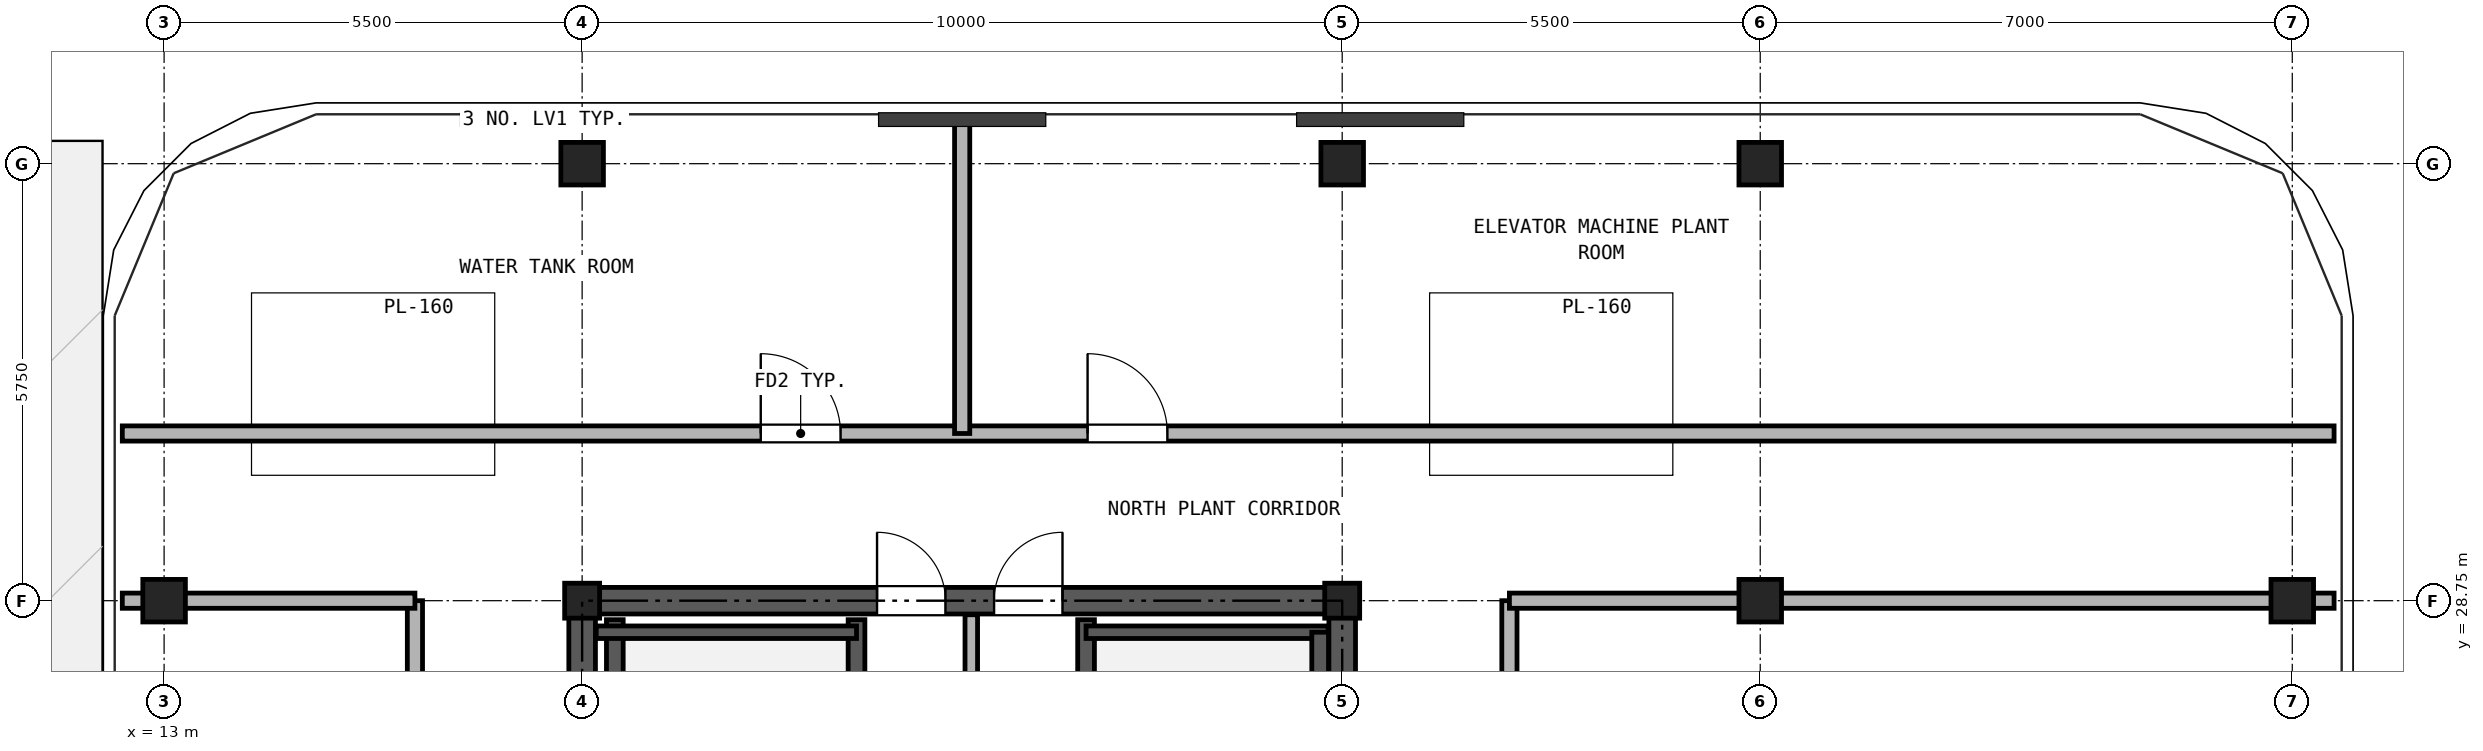
"""IFC4 building model, lengths in metres.
Left out: names, types, materials, properties, quantities, classifications, styles, units other than length and angle.
Written with IfcOpenShell. Run it as: python <this file> out.ifc"""

import sys

from ifc_helpers import new_model, si_unit, direction, frame, frame_2d, origin, origin_2d, place, context, subcontext, project, spatial, rectangle, hollow_rectangle, extrude, source, transform, mapped, element, fill, save


model = new_model("IFC4")
c1 = context("Model", 3, precision=1e-05, world=origin(), true_north=direction((0.0, 1.0)))
c2 = subcontext(c1, "Body", "Model", "MODEL_VIEW")
j1 = project(units=[si_unit("LENGTHUNIT", "METRE"), si_unit("PLANEANGLEUNIT", "RADIAN")], contexts=[c1])
p1 = place(None, origin())
s1 = spatial("IfcSite", under=j1, at=p1, CompositionType="ELEMENT")
p2 = place(p1, origin())
s2 = spatial("IfcBuilding", under=s1, at=p2, CompositionType="ELEMENT")
p3 = place(p2, frame((0.0, 0.0, 278.5)))
s3 = spatial("IfcBuildingStorey", under=s2, at=p3, CompositionType="ELEMENT", Elevation=278.5)
m1 = source(origin(), c2, "Body", "SweptSolid", [
    extrude(hollow_rectangle(XDim=0.56, YDim=0.56, WallThickness=0.03, at=origin_2d()), origin(), (0.0, 0.0, 1.0), 3.38),
])
for number, where, z_axis, x_axis in (
    (1, (18.5, 34.5, 0.0), (0.0, 0.0, 1.0), (1.0, 0.0, 0.0)),
    (2, (28.5, 34.5, 0.0), (0.0, 0.0, 1.0), (1.0, 0.0, 0.0)),
    (3, (34.0, 34.5, 0.0), (0.0, 0.0, 1.0), (1.0, 0.0, 0.0)),
    (4, (13.0, 28.75, 0.0), (0.0, 0.0, 1.0), (1.0, 0.0, 0.0)),
    (5, (41.0, 28.75, 0.0), (0.0, 0.0, 1.0), (1.0, 0.0, 0.0)),
):
    element("IfcColumn", number, at=place(p3, frame(where, z_axis=z_axis, x_axis=x_axis)), inside=s3, PredefinedType="COLUMN", context=c2, shape_type="MappedRepresentation", body=[
        mapped(m1, transform((0.0, 0.0, 0.0), x_axis=(1.0, 0.0, 0.0), y_axis=(0.0, 1.0, 0.0), z_axis=(0.0, 0.0, 1.0), scale=1.0)),
    ])
m2 = source(origin(), c2, "Body", "SweptSolid", [
    extrude(hollow_rectangle(XDim=0.46, YDim=0.46, WallThickness=0.025, at=origin_2d()), origin(), (0.0, 0.0, 1.0), 3.38),
])
for number, where, z_axis, x_axis in (
    (6, (18.5, 28.75, 0.0), (0.0, 0.0, 1.0), (1.0, 0.0, 0.0)),
    (7, (28.5, 28.75, 0.0), (0.0, 0.0, 1.0), (1.0, 0.0, 0.0)),
):
    element("IfcColumn", number, at=place(p3, frame(where, z_axis=z_axis, x_axis=x_axis)), inside=s3, PredefinedType="COLUMN", context=c2, shape_type="MappedRepresentation", body=[
        mapped(m2, transform((0.0, 0.0, 0.0), x_axis=(1.0, 0.0, 0.0), y_axis=(0.0, 1.0, 0.0), z_axis=(0.0, 0.0, 1.0), scale=1.0)),
    ])
p4 = place(p3, frame((34.0, 28.75, 0.0), z_axis=(0.0, 0.0, 1.0), x_axis=(1.0, 0.0, 0.0)))
e8 = element("IfcColumn", 8, at=p4, inside=s3, PredefinedType="COLUMN", context=c2, shape_type="MappedRepresentation", body=[
    mapped(m1, transform((0.0, 0.0, 0.0), x_axis=(1.0, 0.0, 0.0), y_axis=(0.0, 1.0, 0.0), z_axis=(0.0, 0.0, 1.0), scale=1.0)),
])
p5 = place(p3, frame((18.325, 28.75, 0.0), z_axis=(0.0, 0.0, 1.0), x_axis=(1.0, 0.0, 0.0)))
e9 = element("IfcWall", 9, at=p5, inside=s3, PredefinedType="SHEAR", context=c2, shape_type="SweptSolid", body=[
    extrude(rectangle(XDim=10.35, YDim=0.35, at=frame_2d((5.175, 0.0))), origin(), (0.0, 0.0, 1.0), 3.38),
])
p6 = place(p5, frame((4.055, 0.0, 0.0)))
e10 = element("IfcOpeningElement", 10, at=p6, cuts=e9, PredefinedType="OPENING", context=c2, shape_type="SweptSolid", body=[
    extrude(rectangle(XDim=0.9, YDim=2.05, at=frame_2d((0.45, 1.025))), frame((0.0, 0.185, 0.0), z_axis=(0.0, -1.0, 0.0), x_axis=(1.0, 0.0, 0.0)), (0.0, 0.0, 1.0), 0.37),
])
p7 = place(p5, frame((5.595, 0.0, 0.0)))
e11 = element("IfcOpeningElement", 11, at=p7, cuts=e9, PredefinedType="OPENING", context=c2, shape_type="SweptSolid", body=[
    extrude(rectangle(XDim=0.9, YDim=2.05, at=frame_2d((0.45, 1.025))), frame((0.0, 0.185, 0.0), z_axis=(0.0, -1.0, 0.0), x_axis=(1.0, 0.0, 0.0)), (0.0, 0.0, 1.0), 0.37),
])
p8 = place(p3, frame((18.5, 11.675, 0.0), z_axis=(0.0, 0.0, 1.0), x_axis=(0.0, 1.0, 0.0)))
e12 = element("IfcWall", 12, at=p8, inside=s3, PredefinedType="SHEAR", context=c2, shape_type="SweptSolid", body=[
    extrude(rectangle(XDim=16.9, YDim=0.35, at=frame_2d((8.45, 0.0))), origin(), (0.0, 0.0, 1.0), 3.38),
])
p9 = place(p8, frame((7.475, 0.0, 0.0)))
e13 = element("IfcOpeningElement", 13, at=p9, cuts=e12, PredefinedType="OPENING", context=c2, shape_type="SweptSolid", body=[
    extrude(rectangle(XDim=1.15, YDim=2.2, at=frame_2d((0.575, 1.1))), frame((0.0, 0.185, 0.0), z_axis=(0.0, -1.0, 0.0), x_axis=(1.0, 0.0, 0.0)), (0.0, 0.0, 1.0), 0.37),
])
p10 = place(p3, frame((28.5, 11.675, 0.0), z_axis=(0.0, 0.0, 1.0), x_axis=(0.0, 1.0, 0.0)))
e14 = element("IfcWall", 14, at=p10, inside=s3, PredefinedType="SHEAR", context=c2, shape_type="SweptSolid", body=[
    extrude(rectangle(XDim=16.9, YDim=0.35, at=frame_2d((8.45, 0.0))), origin(), (0.0, 0.0, 1.0), 3.38),
])
p11 = place(p10, frame((7.475, 0.0, 0.0)))
e15 = element("IfcOpeningElement", 15, at=p11, cuts=e14, PredefinedType="OPENING", context=c2, shape_type="SweptSolid", body=[
    extrude(rectangle(XDim=1.15, YDim=2.2, at=frame_2d((0.575, 1.1))), frame((0.0, 0.185, 0.0), z_axis=(0.0, -1.0, 0.0), x_axis=(1.0, 0.0, 0.0)), (0.0, 0.0, 1.0), 0.37),
])
for number, where, z_axis, x_axis in (
    (16, (18.93, 21.39, 0.0), (0.0, 0.0, 1.0), (0.0, 1.0, 0.0)),
    (17, (22.11, 21.39, 0.0), (0.0, 0.0, 1.0), (0.0, 1.0, 0.0)),
    (18, (25.13, 21.39, 0.0), (0.0, 0.0, 1.0), (0.0, 1.0, 0.0)),
):
    element("IfcWall", number, at=place(p3, frame(where, z_axis=z_axis, x_axis=x_axis)), inside=s3, PredefinedType="SOLIDWALL", context=c2, shape_type="SweptSolid", body=[
        extrude(rectangle(XDim=7.11, YDim=0.22, at=frame_2d((3.555, 0.0))), origin(), (0.0, 0.0, 1.0), 3.38),
    ])
p12 = place(p3, frame((18.685, 28.335, 0.0), z_axis=(0.0, 0.0, 1.0), x_axis=(1.0, 0.0, 0.0)))
e19 = element("IfcWall", 19, at=p12, inside=s3, PredefinedType="PARTITIONING", context=c2, shape_type="SweptSolid", body=[
    extrude(rectangle(XDim=3.425, YDim=0.165, at=frame_2d((1.712, 0.0))), origin(), (0.0, 0.0, 1.0), 3.38),
])
p13 = place(p3, frame((25.13, 28.335, 0.0), z_axis=(0.0, 0.0, 1.0), x_axis=(1.0, 0.0, 0.0)))
e20 = element("IfcWall", 20, at=p13, inside=s3, PredefinedType="PARTITIONING", context=c2, shape_type="SweptSolid", body=[
    extrude(rectangle(XDim=3.185, YDim=0.165, at=frame_2d((1.593, 0.0))), origin(), (0.0, 0.0, 1.0), 3.38),
])
p14 = place(p3, frame((28.21, 21.39, 0.0), z_axis=(0.0, 0.0, 1.0), x_axis=(0.0, 1.0, 0.0)))
e21 = element("IfcWall", 21, at=p14, inside=s3, PredefinedType="SOLIDWALL", context=c2, shape_type="SweptSolid", body=[
    extrude(rectangle(XDim=6.945, YDim=0.22, at=frame_2d((3.473, 0.0))), origin(), (0.0, 0.0, 1.0), 3.38),
])
p15 = place(p3, frame((23.62, 24.4, 0.0), z_axis=(0.0, 0.0, 1.0), x_axis=(0.0, 1.0, 0.0)))
e22 = element("IfcWall", 22, at=p15, inside=s3, PredefinedType="PARTITIONING", context=c2, shape_type="SweptSolid", body=[
    extrude(rectangle(XDim=4.165, YDim=0.165, at=frame_2d((2.083, 0.0))), origin(), (0.0, 0.0, 1.0), 3.38),
])
p16 = place(p3, frame((12.45, 30.95, 0.0), z_axis=(0.0, 0.0, 1.0), x_axis=(1.0, 0.0, 0.0)))
e23 = element("IfcWall", 23, at=p16, inside=s3, PredefinedType="PARTITIONING", context=c2, shape_type="SweptSolid", body=[
    extrude(rectangle(XDim=29.1, YDim=0.2, at=frame_2d((14.55, 0.0))), origin(), (0.0, 0.0, 1.0), 3.38),
])
p17 = place(p16, frame((8.4, 0.0, 0.0)))
e24 = element("IfcOpeningElement", 24, at=p17, cuts=e23, PredefinedType="OPENING", context=c2, shape_type="SweptSolid", body=[
    extrude(rectangle(XDim=1.05, YDim=2.15, at=frame_2d((0.525, 1.075))), frame((0.0, 0.11, 0.0), z_axis=(0.0, -1.0, 0.0), x_axis=(1.0, 0.0, 0.0)), (0.0, 0.0, 1.0), 0.22),
])
p18 = place(p16, frame((12.7, 0.0, 0.0)))
e25 = element("IfcOpeningElement", 25, at=p18, cuts=e23, PredefinedType="OPENING", context=c2, shape_type="SweptSolid", body=[
    extrude(rectangle(XDim=1.05, YDim=2.15, at=frame_2d((0.525, 1.075))), frame((0.0, 0.11, 0.0), z_axis=(0.0, -1.0, 0.0), x_axis=(1.0, 0.0, 0.0)), (0.0, 0.0, 1.0), 0.22),
])
p19 = place(p3, frame((16.3, 8.9, 0.0), z_axis=(0.0, 0.0, 1.0), x_axis=(0.0, 1.0, 0.0)))
e26 = element("IfcWall", 26, at=p19, inside=s3, PredefinedType="PARTITIONING", context=c2, shape_type="SweptSolid", body=[
    extrude(rectangle(XDim=19.85, YDim=0.2, at=frame_2d((9.925, 0.0))), origin(), (0.0, 0.0, 1.0), 3.38),
])
p20 = place(p19, frame((4.55, 0.0, 0.0)))
e27 = element("IfcOpeningElement", 27, at=p20, cuts=e26, PredefinedType="OPENING", context=c2, shape_type="SweptSolid", body=[
    extrude(rectangle(XDim=1.05, YDim=2.15, at=frame_2d((0.525, 1.075))), frame((0.0, 0.11, 0.0), z_axis=(0.0, -1.0, 0.0), x_axis=(1.0, 0.0, 0.0)), (0.0, 0.0, 1.0), 0.22),
])
p21 = place(p19, frame((14.475, 0.0, 0.0)))
e28 = element("IfcOpeningElement", 28, at=p21, cuts=e26, PredefinedType="OPENING", context=c2, shape_type="SweptSolid", body=[
    extrude(rectangle(XDim=1.05, YDim=2.15, at=frame_2d((0.525, 1.075))), frame((0.0, 0.11, 0.0), z_axis=(0.0, -1.0, 0.0), x_axis=(1.0, 0.0, 0.0)), (0.0, 0.0, 1.0), 0.22),
])
p22 = place(p3, frame((30.7, 8.9, 0.0), z_axis=(0.0, 0.0, 1.0), x_axis=(0.0, 1.0, 0.0)))
e29 = element("IfcWall", 29, at=p22, inside=s3, PredefinedType="PARTITIONING", context=c2, shape_type="SweptSolid", body=[
    extrude(rectangle(XDim=19.85, YDim=0.2, at=frame_2d((9.925, 0.0))), origin(), (0.0, 0.0, 1.0), 3.38),
])
p23 = place(p22, frame((9.425, 0.0, 0.0)))
e30 = element("IfcOpeningElement", 30, at=p23, cuts=e29, PredefinedType="OPENING", context=c2, shape_type="SweptSolid", body=[
    extrude(rectangle(XDim=1.05, YDim=2.15, at=frame_2d((0.525, 1.075))), frame((0.0, 0.11, 0.0), z_axis=(0.0, -1.0, 0.0), x_axis=(1.0, 0.0, 0.0)), (0.0, 0.0, 1.0), 0.22),
])
p24 = place(p3, frame((12.45, 28.75, 0.0), z_axis=(0.0, 0.0, 1.0), x_axis=(1.0, 0.0, 0.0)))
e31 = element("IfcWall", 31, at=p24, inside=s3, PredefinedType="PARTITIONING", context=c2, shape_type="SweptSolid", body=[
    extrude(rectangle(XDim=3.85, YDim=0.2, at=frame_2d((1.925, 0.0))), origin(), (0.0, 0.0, 1.0), 2.905),
])
p25 = place(p3, frame((30.7, 28.75, 0.0), z_axis=(0.0, 0.0, 1.0), x_axis=(1.0, 0.0, 0.0)))
e32 = element("IfcWall", 32, at=p25, inside=s3, PredefinedType="PARTITIONING", context=c2, shape_type="SweptSolid", body=[
    extrude(rectangle(XDim=10.85, YDim=0.2, at=frame_2d((5.425, 0.0))), origin(), (0.0, 0.0, 1.0), 2.905),
])
p26 = place(p3, frame((23.5, 30.95, 0.0), z_axis=(0.0, 0.0, 1.0), x_axis=(0.0, 1.0, 0.0)))
e33 = element("IfcWall", 33, at=p26, inside=s3, PredefinedType="PARTITIONING", context=c2, shape_type="SweptSolid", body=[
    extrude(rectangle(XDim=4.1, YDim=0.2, at=frame_2d((2.05, 0.0))), origin(), (0.0, 0.0, 1.0), 3.38),
])
p27 = place(p6, origin())
e34 = element("IfcDoor", 34, at=p27, inside=s3, OperationType="SINGLE_SWING_LEFT", PredefinedType="DOOR", context=c2, shape_type="SweptSolid", body=[
    extrude(rectangle(XDim=0.9, YDim=2.05, at=frame_2d((0.45, 1.025))), frame((0.0, 0.025, 0.0), z_axis=(0.0, -1.0, 0.0), x_axis=(1.0, 0.0, 0.0)), (0.0, 0.0, 1.0), 0.05),
])
fill(e10, e34)
p28 = place(p7, origin())
e35 = element("IfcDoor", 35, at=p28, inside=s3, OperationType="SINGLE_SWING_RIGHT", PredefinedType="DOOR", context=c2, shape_type="SweptSolid", body=[
    extrude(rectangle(XDim=0.9, YDim=2.05, at=frame_2d((0.45, 1.025))), frame((0.0, 0.025, 0.0), z_axis=(0.0, -1.0, 0.0), x_axis=(1.0, 0.0, 0.0)), (0.0, 0.0, 1.0), 0.05),
])
fill(e11, e35)
p29 = place(p17, origin())
e36 = element("IfcDoor", 36, at=p29, inside=s3, OperationType="SINGLE_SWING_LEFT", PredefinedType="DOOR", context=c2, shape_type="SweptSolid", body=[
    extrude(rectangle(XDim=1.05, YDim=2.15, at=frame_2d((0.525, 1.075))), frame((0.0, 0.025, 0.0), z_axis=(0.0, -1.0, 0.0), x_axis=(1.0, 0.0, 0.0)), (0.0, 0.0, 1.0), 0.05),
])
fill(e24, e36)
p30 = place(p18, origin())
e37 = element("IfcDoor", 37, at=p30, inside=s3, OperationType="SINGLE_SWING_LEFT", PredefinedType="DOOR", context=c2, shape_type="SweptSolid", body=[
    extrude(rectangle(XDim=1.05, YDim=2.15, at=frame_2d((0.525, 1.075))), frame((0.0, 0.025, 0.0), z_axis=(0.0, -1.0, 0.0), x_axis=(1.0, 0.0, 0.0)), (0.0, 0.0, 1.0), 0.05),
])
fill(e25, e37)
save(model, sys.argv[1])
